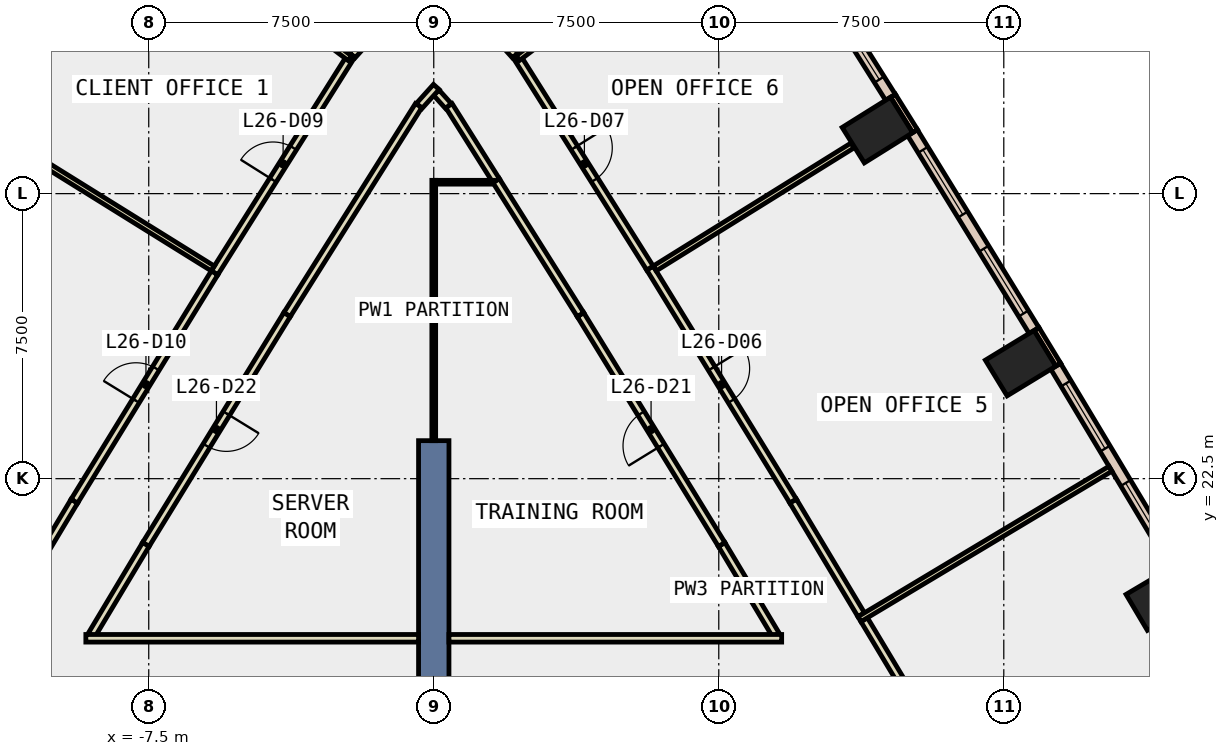
"""IFC4 building model, lengths in metres.
Left out: names, types, materials, properties, quantities, classifications, styles, units other than length and angle.
Written with IfcOpenShell. Run it as: python <this file> out.ifc"""

import sys

from ifc_helpers import new_model, si_unit, direction, frame, frame_2d, origin, origin_2d, place, context, subcontext, project, spatial, rectangle, extrude, element, fill, save


model = new_model("IFC4")
c1 = context("Model", 3, precision=1e-05, world=origin(), true_north=direction((0.0, 1.0)))
c2 = subcontext(c1, "Body", "Model", "MODEL_VIEW")
j1 = project(units=[si_unit("LENGTHUNIT", "METRE"), si_unit("PLANEANGLEUNIT", "RADIAN")], contexts=[c1])
p1 = place(None, origin())
s1 = spatial("IfcSite", under=j1, at=p1, CompositionType="ELEMENT")
p2 = place(p1, origin())
s2 = spatial("IfcBuilding", under=s1, at=p2, CompositionType="ELEMENT")
p3 = place(p2, frame((0.0, 0.0, 120.2)))
s3 = spatial("IfcBuildingStorey", under=s2, at=p3, CompositionType="ELEMENT", Elevation=120.2)
for number, where, z_axis, x_axis in (
    (1, (19.143, 19.364, -0.4), (0.0, 0.0, 1.0), (-0.51, 0.86, 0.0)),
    (2, (15.442, 25.539, -0.4), (0.0, 0.0, 1.0), (-0.52, 0.854, 0.0)),
    (3, (11.675, 31.673, -0.4), (0.0, 0.0, 1.0), (-0.53, 0.848, 0.0)),
):
    element("IfcColumn", number, at=place(p3, frame(where, z_axis=z_axis, x_axis=x_axis)), inside=s3, PredefinedType="COLUMN", context=c2, shape_type="SweptSolid", body=[
        extrude(rectangle(XDim=1.1, YDim=1.5, at=origin_2d()), origin(), (0.0, 0.0, 1.0), 4.2),
    ])
p4 = place(p3, frame((0.0, 14.5, -0.4), z_axis=(0.0, 0.0, 1.0), x_axis=(0.0, 1.0, 0.0)))
e4 = element("IfcWall", 4, at=p4, inside=s3, PredefinedType="SHEAR", context=c2, shape_type="SweptSolid", body=[
    extrude(rectangle(XDim=9.0, YDim=0.8, at=frame_2d((4.5, 0.0))), origin(), (0.0, 0.0, 1.0), 4.2),
])
p5 = place(p3, frame((16.433, 25.498, 0.0), z_axis=(0.0, 0.0, 1.0), x_axis=(-0.519869515594, 0.854245682901, 0.0)))
e5 = element("IfcWall", 5, at=p5, inside=s3, PredefinedType="STANDARD", context=c2, shape_type="SweptSolid", body=[
    extrude(rectangle(XDim=1.1, YDim=0.15, at=frame_2d((0.55, 0.0))), origin(), (0.0, 0.0, 1.0), 3.8),
])
p6 = place(p3, frame((12.666, 31.644, 0.0), z_axis=(0.0, 0.0, 1.0), x_axis=(-0.52997899071, 0.848010771987, 0.0)))
e6 = element("IfcWall", 6, at=p6, inside=s3, PredefinedType="STANDARD", context=c2, shape_type="SweptSolid", body=[
    extrude(rectangle(XDim=1.1, YDim=0.15, at=frame_2d((0.55, 0.0))), origin(), (0.0, 0.0, 1.0), 3.8),
])
p7 = place(p3, frame((19.506, 20.217, 0.0), z_axis=(0.0, 0.0, 1.0), x_axis=(-0.514078503149, 0.857743139057, 0.0)))
e7 = element("IfcWall", 7, at=p7, inside=s3, PredefinedType="STANDARD", context=c2, shape_type="SweptSolid", body=[
    extrude(rectangle(XDim=6.11, YDim=0.3, at=frame_2d((3.055, 0.0))), origin(), (0.0, 0.0, 1.0), 3.8),
])
p8 = place(p7, frame((0.528, 0.0, 0.9)))
e8 = element("IfcOpeningElement", 8, at=p8, cuts=e7, PredefinedType="OPENING", context=c2, shape_type="SweptSolid", body=[
    extrude(rectangle(XDim=2.0, YDim=2.6, at=frame_2d((1.0, 1.3))), frame((0.0, 0.16, 0.0), z_axis=(0.0, -1.0, 0.0), x_axis=(1.0, 0.0, 0.0)), (0.0, 0.0, 1.0), 0.32),
])
p9 = place(p7, frame((3.583, 0.0, 0.9)))
e9 = element("IfcOpeningElement", 9, at=p9, cuts=e7, PredefinedType="OPENING", context=c2, shape_type="SweptSolid", body=[
    extrude(rectangle(XDim=2.0, YDim=2.6, at=frame_2d((1.0, 1.3))), frame((0.0, 0.16, 0.0), z_axis=(0.0, -1.0, 0.0), x_axis=(1.0, 0.0, 0.0)), (0.0, 0.0, 1.0), 0.32),
])
p10 = place(p3, frame((15.796, 26.397, 0.0), z_axis=(0.0, 0.0, 1.0), x_axis=(-0.523417276981, 0.852076495485, 0.0)))
e10 = element("IfcWall", 10, at=p10, inside=s3, PredefinedType="STANDARD", context=c2, shape_type="SweptSolid", body=[
    extrude(rectangle(XDim=6.11, YDim=0.3, at=frame_2d((3.055, 0.0))), origin(), (0.0, 0.0, 1.0), 3.8),
])
p11 = place(p10, frame((0.527, 0.0, 0.9)))
e11 = element("IfcOpeningElement", 11, at=p11, cuts=e10, PredefinedType="OPENING", context=c2, shape_type="SweptSolid", body=[
    extrude(rectangle(XDim=2.0, YDim=2.6, at=frame_2d((1.0, 1.3))), frame((0.0, 0.16, 0.0), z_axis=(0.0, -1.0, 0.0), x_axis=(1.0, 0.0, 0.0)), (0.0, 0.0, 1.0), 0.32),
])
p12 = place(p10, frame((3.582, 0.0, 0.9)))
e12 = element("IfcOpeningElement", 12, at=p12, cuts=e10, PredefinedType="OPENING", context=c2, shape_type="SweptSolid", body=[
    extrude(rectangle(XDim=2.0, YDim=2.6, at=frame_2d((1.0, 1.3))), frame((0.0, 0.16, 0.0), z_axis=(0.0, -1.0, 0.0), x_axis=(1.0, 0.0, 0.0)), (0.0, 0.0, 1.0), 0.32),
])
p13 = place(p3, frame((12.018, 32.535, 0.0), z_axis=(0.0, 0.0, 1.0), x_axis=(-0.532699467907, 0.846304482377, 0.0)))
e13 = element("IfcWall", 13, at=p13, inside=s3, PredefinedType="STANDARD", context=c2, shape_type="SweptSolid", body=[
    extrude(rectangle(XDim=6.202, YDim=0.3, at=frame_2d((3.101, 0.0))), origin(), (0.0, 0.0, 1.0), 3.8),
])
p14 = place(p13, frame((0.551, 0.0, 0.9)))
e14 = element("IfcOpeningElement", 14, at=p14, cuts=e13, PredefinedType="OPENING", context=c2, shape_type="SweptSolid", body=[
    extrude(rectangle(XDim=2.0, YDim=2.6, at=frame_2d((1.0, 1.3))), frame((0.0, 0.16, 0.0), z_axis=(0.0, -1.0, 0.0), x_axis=(1.0, 0.0, 0.0)), (0.0, 0.0, 1.0), 0.32),
])
p15 = place(p13, frame((3.652, 0.0, 0.9)))
e15 = element("IfcOpeningElement", 15, at=p15, cuts=e13, PredefinedType="OPENING", context=c2, shape_type="SweptSolid", body=[
    extrude(rectangle(XDim=2.0, YDim=2.6, at=frame_2d((1.0, 1.3))), frame((0.0, 0.16, 0.0), z_axis=(0.0, -1.0, 0.0), x_axis=(1.0, 0.0, 0.0)), (0.0, 0.0, 1.0), 0.32),
])
p16 = place(p3, frame((-8.714, 37.784, 0.0), z_axis=(0.0, 0.0, 1.0), x_axis=(-0.532699467907, -0.846304482377, 0.0)))
e16 = element("IfcWall", 16, at=p16, inside=s3, PredefinedType="STANDARD", context=c2, shape_type="SweptSolid", body=[
    extrude(rectangle(XDim=6.202, YDim=0.3, at=frame_2d((3.101, 0.0))), origin(), (0.0, 0.0, 1.0), 3.8),
])
p17 = place(p16, frame((0.551, 0.0, 0.9)))
e17 = element("IfcOpeningElement", 17, at=p17, cuts=e16, PredefinedType="OPENING", context=c2, shape_type="SweptSolid", body=[
    extrude(rectangle(XDim=2.0, YDim=2.6, at=frame_2d((1.0, 1.3))), frame((0.0, 0.16, 0.0), z_axis=(0.0, -1.0, 0.0), x_axis=(1.0, 0.0, 0.0)), (0.0, 0.0, 1.0), 0.32),
])
p18 = place(p16, frame((3.652, 0.0, 0.9)))
e18 = element("IfcOpeningElement", 18, at=p18, cuts=e16, PredefinedType="OPENING", context=c2, shape_type="SweptSolid", body=[
    extrude(rectangle(XDim=2.0, YDim=2.6, at=frame_2d((1.0, 1.3))), frame((0.0, 0.16, 0.0), z_axis=(0.0, -1.0, 0.0), x_axis=(1.0, 0.0, 0.0)), (0.0, 0.0, 1.0), 0.32),
])
p19 = place(p3, frame((9.003, 18.386, 0.0), z_axis=(0.0, 0.0, 1.0), x_axis=(-0.513900868925, 0.857849577092, 0.0)))
e19 = element("IfcWall", 19, at=p19, inside=s3, PredefinedType="PARTITIONING", context=c2, shape_type="SweptSolid", body=[
    extrude(rectangle(XDim=2.777, YDim=0.2, at=frame_2d((1.388, 0.0))), origin(), (0.0, 0.0, 1.0), 3.8),
])
p20 = place(p3, frame((7.576, 20.768, 0.0), z_axis=(0.0, 0.0, 1.0), x_axis=(-0.523390991338, 0.852092641786, 0.0)))
e20 = element("IfcWall", 20, at=p20, inside=s3, PredefinedType="PARTITIONING", context=c2, shape_type="SweptSolid", body=[
    extrude(rectangle(XDim=7.098, YDim=0.2, at=frame_2d((3.549, 0.0))), origin(), (0.0, 0.0, 1.0), 3.8),
])
p21 = place(p20, frame((3.049, 0.0, 0.0)))
e21 = element("IfcOpeningElement", 21, at=p21, cuts=e20, PredefinedType="OPENING", context=c2, shape_type="SweptSolid", body=[
    extrude(rectangle(XDim=1.0, YDim=2.1, at=frame_2d((0.5, 1.05))), frame((0.0, 0.11, 0.0), z_axis=(0.0, -1.0, 0.0), x_axis=(1.0, 0.0, 0.0)), (0.0, 0.0, 1.0), 0.22),
])
p22 = place(p3, frame((3.861, 26.816, 0.0), z_axis=(0.0, 0.0, 1.0), x_axis=(-0.532782188792, 0.846252408745, 0.0)))
e22 = element("IfcWall", 22, at=p22, inside=s3, PredefinedType="PARTITIONING", context=c2, shape_type="SweptSolid", body=[
    extrude(rectangle(XDim=4.167, YDim=0.2, at=frame_2d((2.083, 0.0))), origin(), (0.0, 0.0, 1.0), 3.8),
])
p23 = place(p3, frame((1.641, 30.342, 0.0), z_axis=(0.0, 0.0, 1.0), x_axis=(-0.532732797088, 0.846283502679, 0.0)))
e23 = element("IfcWall", 23, at=p23, inside=s3, PredefinedType="PARTITIONING", context=c2, shape_type="SweptSolid", body=[
    extrude(rectangle(XDim=2.333, YDim=0.2, at=frame_2d((1.167, 0.0))), origin(), (0.0, 0.0, 1.0), 3.8),
])
p24 = place(p3, frame((0.384, 32.306, 0.0), z_axis=(0.0, 0.0, 1.0), x_axis=(-0.669306261406, 0.742986627365, 0.0)))
e24 = element("IfcWall", 24, at=p24, inside=s3, PredefinedType="PARTITIONING", context=c2, shape_type="SweptSolid", body=[
    extrude(rectangle(XDim=0.474, YDim=0.2, at=frame_2d((0.237, 0.0))), origin(), (0.0, 0.0, 1.0), 3.8),
])
p25 = place(p3, frame((0.067, 32.807, 0.0), z_axis=(0.0, 0.0, 1.0), x_axis=(-0.66900475403, -0.74325812413, 0.0)))
e25 = element("IfcWall", 25, at=p25, inside=s3, PredefinedType="PARTITIONING", context=c2, shape_type="SweptSolid", body=[
    extrude(rectangle(XDim=0.674, YDim=0.2, at=frame_2d((0.337, 0.0))), origin(), (0.0, 0.0, 1.0), 3.8),
])
p26 = place(p3, frame((-0.398, 32.317, 0.0), z_axis=(0.0, 0.0, 1.0), x_axis=(-0.53276445777, -0.846263571553, 0.0)))
e26 = element("IfcWall", 26, at=p26, inside=s3, PredefinedType="PARTITIONING", context=c2, shape_type="SweptSolid", body=[
    extrude(rectangle(XDim=6.5, YDim=0.2, at=frame_2d((3.25, 0.0))), origin(), (0.0, 0.0, 1.0), 3.8),
])
p27 = place(p3, frame((-3.861, 26.816, 0.0), z_axis=(0.0, 0.0, 1.0), x_axis=(-0.523390991338, -0.852092641786, 0.0)))
e27 = element("IfcWall", 27, at=p27, inside=s3, PredefinedType="PARTITIONING", context=c2, shape_type="SweptSolid", body=[
    extrude(rectangle(XDim=7.098, YDim=0.2, at=frame_2d((3.549, 0.0))), origin(), (0.0, 0.0, 1.0), 3.8),
])
p28 = place(p27, frame((3.049, 0.0, 0.0)))
e28 = element("IfcOpeningElement", 28, at=p28, cuts=e27, PredefinedType="OPENING", context=c2, shape_type="SweptSolid", body=[
    extrude(rectangle(XDim=1.0, YDim=2.1, at=frame_2d((0.5, 1.05))), frame((0.0, 0.11, 0.0), z_axis=(0.0, -1.0, 0.0), x_axis=(1.0, 0.0, 0.0)), (0.0, 0.0, 1.0), 0.22),
])
p29 = place(p3, frame((-7.576, 20.768, 0.0), z_axis=(0.0, 0.0, 1.0), x_axis=(-0.513900868925, -0.857849577092, 0.0)))
e29 = element("IfcWall", 29, at=p29, inside=s3, PredefinedType="PARTITIONING", context=c2, shape_type="SweptSolid", body=[
    extrude(rectangle(XDim=2.777, YDim=0.2, at=frame_2d((1.388, 0.0))), origin(), (0.0, 0.0, 1.0), 3.8),
])
p30 = place(p3, frame((11.326, 18.79, 0.0), z_axis=(0.0, 0.0, 1.0), x_axis=(0.514155958966, -0.857696712049, 0.0)))
e30 = element("IfcWall", 30, at=p30, inside=s3, PredefinedType="PARTITIONING", context=c2, shape_type="SweptSolid", body=[
    extrude(rectangle(XDim=3.487, YDim=0.2, at=frame_2d((1.744, 0.0))), origin(), (0.0, 0.0, 1.0), 3.8),
])
p31 = place(p3, frame((5.69, 28.042, 0.0), z_axis=(0.0, 0.0, 1.0), x_axis=(0.523381868706, -0.852098245222, 0.0)))
e31 = element("IfcWall", 31, at=p31, inside=s3, PredefinedType="PARTITIONING", context=c2, shape_type="SweptSolid", body=[
    extrude(rectangle(XDim=7.198, YDim=0.2, at=frame_2d((3.599, 0.0))), origin(), (0.0, 0.0, 1.0), 3.8),
])
p32 = place(p31, frame((3.099, 0.0, 0.0)))
e32 = element("IfcOpeningElement", 32, at=p32, cuts=e31, PredefinedType="OPENING", context=c2, shape_type="SweptSolid", body=[
    extrude(rectangle(XDim=1.0, YDim=2.1, at=frame_2d((0.5, 1.05))), frame((0.0, 0.11, 0.0), z_axis=(0.0, -1.0, 0.0), x_axis=(1.0, 0.0, 0.0)), (0.0, 0.0, 1.0), 0.22),
])
p33 = place(p3, frame((9.457, 21.909, 0.0), z_axis=(0.0, 0.0, 1.0), x_axis=(0.513949903813, -0.857820200491, 0.0)))
e33 = element("IfcWall", 33, at=p33, inside=s3, PredefinedType="PARTITIONING", context=c2, shape_type="SweptSolid", body=[
    extrude(rectangle(XDim=3.487, YDim=0.2, at=frame_2d((1.743, 0.0))), origin(), (0.0, 0.0, 1.0), 3.8),
])
p34 = place(p3, frame((2.159, 33.649, 0.0), z_axis=(0.0, 0.0, 1.0), x_axis=(0.532784927572, -0.846250684462, 0.0)))
e34 = element("IfcWall", 34, at=p34, inside=s3, PredefinedType="PARTITIONING", context=c2, shape_type="SweptSolid", body=[
    extrude(rectangle(XDim=6.626, YDim=0.2, at=frame_2d((3.313, 0.0))), origin(), (0.0, 0.0, 1.0), 3.8),
])
p35 = place(p34, frame((2.888, 0.0, 0.0)))
e35 = element("IfcOpeningElement", 35, at=p35, cuts=e34, PredefinedType="OPENING", context=c2, shape_type="SweptSolid", body=[
    extrude(rectangle(XDim=1.0, YDim=2.1, at=frame_2d((0.5, 1.05))), frame((0.0, 0.11, 0.0), z_axis=(0.0, -1.0, 0.0), x_axis=(1.0, 0.0, 0.0)), (0.0, 0.0, 1.0), 0.22),
])
p36 = place(p3, frame((-2.145, 33.639, 0.0), z_axis=(0.0, 0.0, 1.0), x_axis=(0.66965737341, 0.742670184023, 0.0)))
e36 = element("IfcWall", 36, at=p36, inside=s3, PredefinedType="PARTITIONING", context=c2, shape_type="SweptSolid", body=[
    extrude(rectangle(XDim=2.18, YDim=0.2, at=frame_2d((1.09, 0.0))), origin(), (0.0, 0.0, 1.0), 3.8),
])
p37 = place(p36, frame((0.59, 0.0, 0.0)))
e37 = element("IfcOpeningElement", 37, at=p37, cuts=e36, PredefinedType="OPENING", context=c2, shape_type="SweptSolid", body=[
    extrude(rectangle(XDim=1.0, YDim=2.1, at=frame_2d((0.5, 1.05))), frame((0.0, 0.11, 0.0), z_axis=(0.0, -1.0, 0.0), x_axis=(1.0, 0.0, 0.0)), (0.0, 0.0, 1.0), 0.22),
])
p38 = place(p3, frame((0.685, 35.258, 0.0), z_axis=(0.0, 0.0, 1.0), x_axis=(0.66965737341, -0.742670184023, 0.0)))
e38 = element("IfcWall", 38, at=p38, inside=s3, PredefinedType="PARTITIONING", context=c2, shape_type="SweptSolid", body=[
    extrude(rectangle(XDim=2.18, YDim=0.2, at=frame_2d((1.09, 0.0))), origin(), (0.0, 0.0, 1.0), 3.8),
])
p39 = place(p3, frame((-5.769, 27.915, 0.0), z_axis=(0.0, 0.0, 1.0), x_axis=(0.532800846123, 0.846240662206, 0.0)))
e39 = element("IfcWall", 39, at=p39, inside=s3, PredefinedType="PARTITIONING", context=c2, shape_type="SweptSolid", body=[
    extrude(rectangle(XDim=6.776, YDim=0.2, at=frame_2d((3.388, 0.0))), origin(), (0.0, 0.0, 1.0), 3.8),
])
p40 = place(p39, frame((2.888, 0.0, 0.0)))
e40 = element("IfcOpeningElement", 40, at=p40, cuts=e39, PredefinedType="OPENING", context=c2, shape_type="SweptSolid", body=[
    extrude(rectangle(XDim=1.0, YDim=2.1, at=frame_2d((0.5, 1.05))), frame((0.0, 0.11, 0.0), z_axis=(0.0, -1.0, 0.0), x_axis=(1.0, 0.0, 0.0)), (0.0, 0.0, 1.0), 0.22),
])
p41 = place(p3, frame((-11.249, 18.918, 0.0), z_axis=(0.0, 0.0, 1.0), x_axis=(0.513949903813, 0.857820200491, 0.0)))
e41 = element("IfcWall", 41, at=p41, inside=s3, PredefinedType="PARTITIONING", context=c2, shape_type="SweptSolid", body=[
    extrude(rectangle(XDim=3.487, YDim=0.2, at=frame_2d((1.743, 0.0))), origin(), (0.0, 0.0, 1.0), 3.8),
])
p42 = place(p3, frame((-9.457, 21.909, 0.0), z_axis=(0.0, 0.0, 1.0), x_axis=(0.523366731761, 0.852107542559, 0.0)))
e42 = element("IfcWall", 42, at=p42, inside=s3, PredefinedType="PARTITIONING", context=c2, shape_type="SweptSolid", body=[
    extrude(rectangle(XDim=7.049, YDim=0.2, at=frame_2d((3.524, 0.0))), origin(), (0.0, 0.0, 1.0), 3.8),
])
p43 = place(p42, frame((3.099, 0.0, 0.0)))
e43 = element("IfcOpeningElement", 43, at=p43, cuts=e42, PredefinedType="OPENING", context=c2, shape_type="SweptSolid", body=[
    extrude(rectangle(XDim=1.0, YDim=2.1, at=frame_2d((0.5, 1.05))), frame((0.0, 0.11, 0.0), z_axis=(0.0, -1.0, 0.0), x_axis=(1.0, 0.0, 0.0)), (0.0, 0.0, 1.0), 0.22),
])
for number, where, z_axis, x_axis in (
    (44, (0.4, 18.3, 0.0), (0.0, 0.0, 1.0), (1.0, 0.0, 0.0)),
    (45, (-9.155, 18.3, 0.0), (0.0, 0.0, 1.0), (1.0, 0.0, 0.0)),
):
    element("IfcWall", number, at=place(p3, frame(where, z_axis=z_axis, x_axis=x_axis)), inside=s3, PredefinedType="PARTITIONING", context=c2, shape_type="SweptSolid", body=[
        extrude(rectangle(XDim=8.755, YDim=0.2, at=frame_2d((4.377, 0.0))), origin(), (0.0, 0.0, 1.0), 3.8),
    ])
p44 = place(p3, frame((0.0, 23.5, 0.0), z_axis=(0.0, 0.0, 1.0), x_axis=(0.0, 1.0, 0.0)))
e46 = element("IfcWall", 46, at=p44, inside=s3, PredefinedType="PARTITIONING", context=c2, shape_type="SweptSolid", body=[
    extrude(rectangle(XDim=6.85, YDim=0.1, at=frame_2d((3.425, 0.0))), origin(), (0.0, 0.0, 1.0), 3.8),
])
p45 = place(p3, frame((0.05, 30.3, 0.0), z_axis=(0.0, 0.0, 1.0), x_axis=(1.0, 0.0, 0.0)))
e47 = element("IfcWall", 47, at=p45, inside=s3, PredefinedType="PARTITIONING", context=c2, shape_type="SweptSolid", body=[
    extrude(rectangle(XDim=1.518, YDim=0.1, at=frame_2d((0.759, 0.0))), origin(), (0.0, 0.0, 1.0), 3.8),
])
p46 = place(p3, frame((11.202, 18.803, 0.0), z_axis=(0.0, 0.0, 1.0), x_axis=(0.857778149162, 0.514020084062, 0.0)))
e48 = element("IfcWall", 48, at=p46, inside=s3, PredefinedType="PARTITIONING", context=c2, shape_type="SweptSolid", body=[
    extrude(rectangle(XDim=7.7, YDim=0.15, at=frame_2d((3.85, 0.0))), origin(), (0.0, 0.0, 1.0), 3.8),
])
p47 = place(p3, frame((5.814, 28.031, 0.0), z_axis=(0.0, 0.0, 1.0), x_axis=(0.849222099047, 0.528035819324, 0.0)))
e49 = element("IfcWall", 49, at=p47, inside=s3, PredefinedType="PARTITIONING", context=c2, shape_type="SweptSolid", body=[
    extrude(rectangle(XDim=6.13, YDim=0.15, at=frame_2d((3.065, 0.0))), origin(), (0.0, 0.0, 1.0), 3.8),
])
for number, where, z_axis, x_axis in (
    (50, (2.212, 33.565, 0.0), (0.0, 0.0, 1.0), (0.797, 0.603, 0.0)),
    (51, (-2.212, 33.565, 0.0), (0.0, 0.0, 1.0), (-0.797, 0.603, 0.0)),
):
    element("IfcWall", number, at=place(p3, frame(where, z_axis=z_axis, x_axis=x_axis)), inside=s3, PredefinedType="PARTITIONING", context=c2, shape_type="SweptSolid", body=[
        extrude(rectangle(XDim=6.257, YDim=0.15, at=frame_2d((3.128, 0.0))), origin(), (0.0, 0.0, 1.0), 3.8),
    ])
p48 = place(p3, frame((-5.814, 28.031, 0.0), z_axis=(0.0, 0.0, 1.0), x_axis=(-0.849222099047, 0.528035819324, 0.0)))
e52 = element("IfcWall", 52, at=p48, inside=s3, PredefinedType="PARTITIONING", context=c2, shape_type="SweptSolid", body=[
    extrude(rectangle(XDim=6.13, YDim=0.15, at=frame_2d((3.065, 0.0))), origin(), (0.0, 0.0, 1.0), 3.8),
])
p49 = place(p8, origin())
e53 = element("IfcWindow", 53, at=p49, inside=s3, PartitioningType="SINGLE_PANEL", PredefinedType="WINDOW", context=c2, shape_type="SweptSolid", body=[
    extrude(rectangle(XDim=2.0, YDim=2.6, at=frame_2d((1.0, 1.3))), frame((0.0, 0.03, 0.0), z_axis=(0.0, -1.0, 0.0), x_axis=(1.0, 0.0, 0.0)), (0.0, 0.0, 1.0), 0.06),
])
fill(e8, e53)
p50 = place(p9, origin())
e54 = element("IfcWindow", 54, at=p50, inside=s3, PartitioningType="SINGLE_PANEL", PredefinedType="WINDOW", context=c2, shape_type="SweptSolid", body=[
    extrude(rectangle(XDim=2.0, YDim=2.6, at=frame_2d((1.0, 1.3))), frame((0.0, 0.03, 0.0), z_axis=(0.0, -1.0, 0.0), x_axis=(1.0, 0.0, 0.0)), (0.0, 0.0, 1.0), 0.06),
])
fill(e9, e54)
p51 = place(p11, origin())
e55 = element("IfcWindow", 55, at=p51, inside=s3, PartitioningType="SINGLE_PANEL", PredefinedType="WINDOW", context=c2, shape_type="SweptSolid", body=[
    extrude(rectangle(XDim=2.0, YDim=2.6, at=frame_2d((1.0, 1.3))), frame((0.0, 0.03, 0.0), z_axis=(0.0, -1.0, 0.0), x_axis=(1.0, 0.0, 0.0)), (0.0, 0.0, 1.0), 0.06),
])
fill(e11, e55)
p52 = place(p12, origin())
e56 = element("IfcWindow", 56, at=p52, inside=s3, PartitioningType="SINGLE_PANEL", PredefinedType="WINDOW", context=c2, shape_type="SweptSolid", body=[
    extrude(rectangle(XDim=2.0, YDim=2.6, at=frame_2d((1.0, 1.3))), frame((0.0, 0.03, 0.0), z_axis=(0.0, -1.0, 0.0), x_axis=(1.0, 0.0, 0.0)), (0.0, 0.0, 1.0), 0.06),
])
fill(e12, e56)
p53 = place(p14, origin())
e57 = element("IfcWindow", 57, at=p53, inside=s3, PartitioningType="SINGLE_PANEL", PredefinedType="WINDOW", context=c2, shape_type="SweptSolid", body=[
    extrude(rectangle(XDim=2.0, YDim=2.6, at=frame_2d((1.0, 1.3))), frame((0.0, 0.03, 0.0), z_axis=(0.0, -1.0, 0.0), x_axis=(1.0, 0.0, 0.0)), (0.0, 0.0, 1.0), 0.06),
])
fill(e14, e57)
p54 = place(p32, origin())
e58 = element("IfcDoor", 58, at=p54, inside=s3, OperationType="SINGLE_SWING_LEFT", PredefinedType="DOOR", context=c2, shape_type="SweptSolid", body=[
    extrude(rectangle(XDim=1.0, YDim=2.1, at=frame_2d((0.5, 1.05))), frame((0.0, 0.025, 0.0), z_axis=(0.0, -1.0, 0.0), x_axis=(1.0, 0.0, 0.0)), (0.0, 0.0, 1.0), 0.05),
])
fill(e32, e58)
p55 = place(p35, origin())
e59 = element("IfcDoor", 59, at=p55, inside=s3, OperationType="SINGLE_SWING_LEFT", PredefinedType="DOOR", context=c2, shape_type="SweptSolid", body=[
    extrude(rectangle(XDim=1.0, YDim=2.1, at=frame_2d((0.5, 1.05))), frame((0.0, 0.025, 0.0), z_axis=(0.0, -1.0, 0.0), x_axis=(1.0, 0.0, 0.0)), (0.0, 0.0, 1.0), 0.05),
])
fill(e35, e59)
p56 = place(p40, origin())
e60 = element("IfcDoor", 60, at=p56, inside=s3, OperationType="SINGLE_SWING_LEFT", PredefinedType="DOOR", context=c2, shape_type="SweptSolid", body=[
    extrude(rectangle(XDim=1.0, YDim=2.1, at=frame_2d((0.5, 1.05))), frame((0.0, 0.025, 0.0), z_axis=(0.0, -1.0, 0.0), x_axis=(1.0, 0.0, 0.0)), (0.0, 0.0, 1.0), 0.05),
])
fill(e40, e60)
p57 = place(p43, origin())
e61 = element("IfcDoor", 61, at=p57, inside=s3, OperationType="SINGLE_SWING_LEFT", PredefinedType="DOOR", context=c2, shape_type="SweptSolid", body=[
    extrude(rectangle(XDim=1.0, YDim=2.1, at=frame_2d((0.5, 1.05))), frame((0.0, 0.025, 0.0), z_axis=(0.0, -1.0, 0.0), x_axis=(1.0, 0.0, 0.0)), (0.0, 0.0, 1.0), 0.05),
])
fill(e43, e61)
p58 = place(p21, origin())
e62 = element("IfcDoor", 62, at=p58, inside=s3, OperationType="SINGLE_SWING_LEFT", PredefinedType="DOOR", context=c2, shape_type="SweptSolid", body=[
    extrude(rectangle(XDim=1.0, YDim=2.1, at=frame_2d((0.5, 1.05))), frame((0.0, 0.025, 0.0), z_axis=(0.0, -1.0, 0.0), x_axis=(1.0, 0.0, 0.0)), (0.0, 0.0, 1.0), 0.05),
])
fill(e21, e62)
p59 = place(p28, origin())
e63 = element("IfcDoor", 63, at=p59, inside=s3, OperationType="SINGLE_SWING_LEFT", PredefinedType="DOOR", context=c2, shape_type="SweptSolid", body=[
    extrude(rectangle(XDim=1.0, YDim=2.1, at=frame_2d((0.5, 1.05))), frame((0.0, 0.025, 0.0), z_axis=(0.0, -1.0, 0.0), x_axis=(1.0, 0.0, 0.0)), (0.0, 0.0, 1.0), 0.05),
])
fill(e28, e63)
save(model, sys.argv[1])
